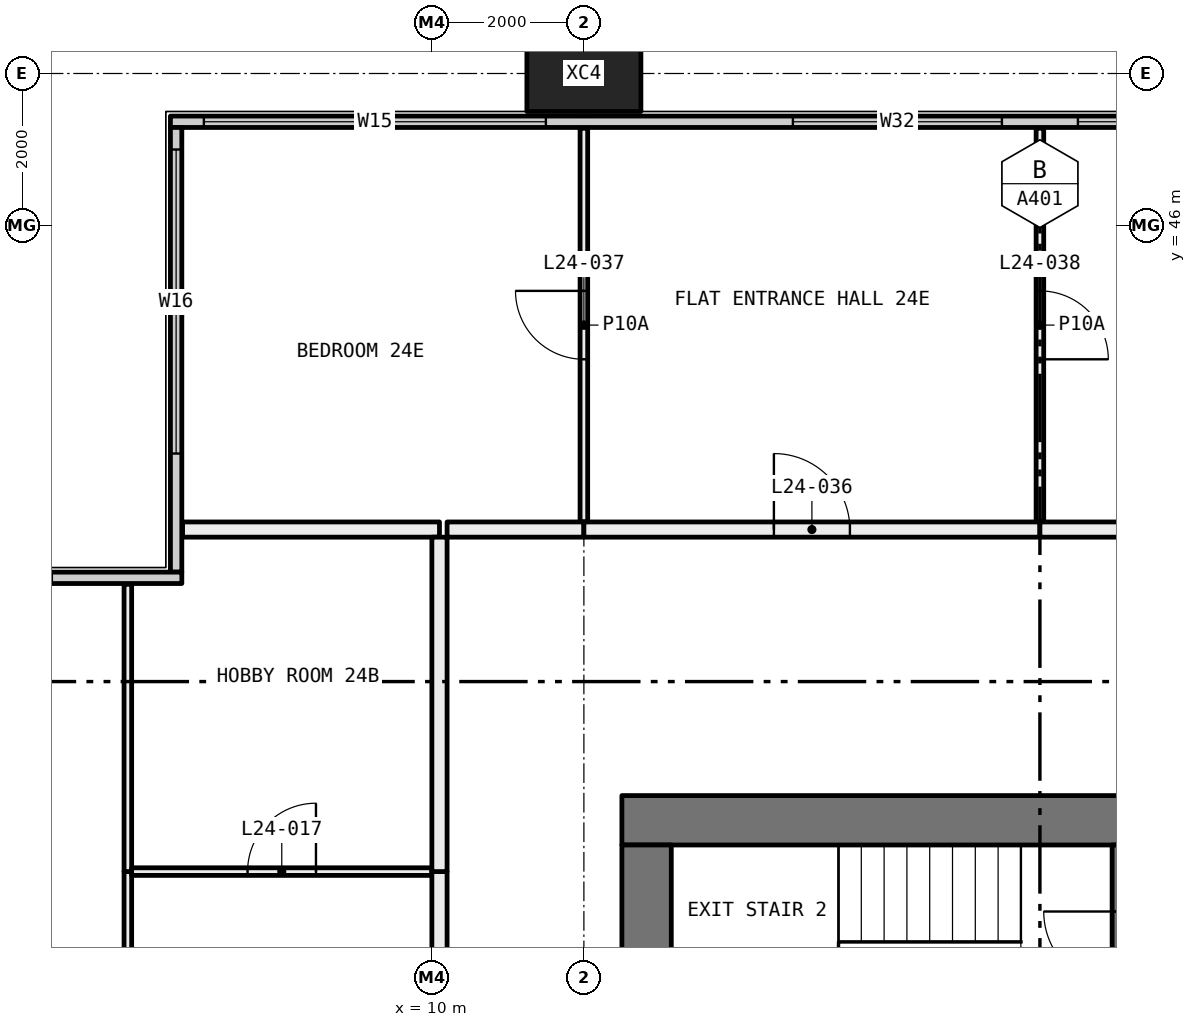
"""IFC4 building model, lengths in metres.
Left out: names, types, materials, properties, quantities, classifications, styles, units other than length and angle.
Written with IfcOpenShell. Run it as: python <this file> out.ifc"""

import sys

from ifc_helpers import new_model, si_unit, direction, frame, frame_2d, origin, origin_2d, place, context, subcontext, project, spatial, rectangle, hollow_rectangle, extrude, element, fill, save


model = new_model("IFC4")
c1 = context("Model", 3, precision=1e-05, world=origin(), true_north=direction((0.0, 1.0)))
c2 = subcontext(c1, "Body", "Model", "MODEL_VIEW")
j1 = project(units=[si_unit("LENGTHUNIT", "METRE"), si_unit("PLANEANGLEUNIT", "RADIAN")], contexts=[c1])
p1 = place(None, origin())
s1 = spatial("IfcSite", under=j1, at=p1, CompositionType="ELEMENT")
p2 = place(p1, origin())
s2 = spatial("IfcBuilding", under=s1, at=p2, CompositionType="ELEMENT")
p3 = place(p2, frame((0.0, 0.0, 96.6)))
s3 = spatial("IfcBuildingStorey", under=s2, at=p3, CompositionType="ELEMENT", Elevation=96.6)
p4 = place(p3, frame((12.0, 48.0, -0.4), z_axis=(0.0, 0.0, 1.0), x_axis=(1.0, 0.0, 0.0)))
e1 = element("IfcColumn", 1, at=p4, inside=s3, PredefinedType="COLUMN", context=c2, shape_type="SweptSolid", body=[
    extrude(hollow_rectangle(XDim=1.5, YDim=1.0, WallThickness=0.06, at=origin_2d()), origin(), (0.0, 0.0, 1.0), 3.45),
])
p5 = place(p3, frame((6.56, 47.365, 0.0), z_axis=(0.0, 0.0, 1.0), x_axis=(1.0, 0.0, 0.0)))
e2 = element("IfcWall", 2, at=p5, inside=s3, PredefinedType="ELEMENTEDWALL", context=c2, shape_type="SweptSolid", body=[
    extrude(rectangle(XDim=58.88, YDim=0.15, at=frame_2d((29.44, 0.0))), origin(), (0.0, 0.0, 1.0), 3.05),
])
p6 = place(p5, frame((0.44, 0.0, 0.45)))
e3 = element("IfcOpeningElement", 3, at=p6, cuts=e2, PredefinedType="OPENING", context=c2, shape_type="SweptSolid", body=[
    extrude(rectangle(XDim=4.5, YDim=2.55, at=frame_2d((2.25, 1.275))), frame((0.0, 0.085, 0.0), z_axis=(0.0, -1.0, 0.0), x_axis=(1.0, 0.0, 0.0)), (0.0, 0.0, 1.0), 0.17),
])
p7 = place(p5, frame((8.19, 0.0, 0.45)))
e4 = element("IfcOpeningElement", 4, at=p7, cuts=e2, PredefinedType="OPENING", context=c2, shape_type="SweptSolid", body=[
    extrude(rectangle(XDim=2.75, YDim=2.55, at=frame_2d((1.375, 1.275))), frame((0.0, 0.085, 0.0), z_axis=(0.0, -1.0, 0.0), x_axis=(1.0, 0.0, 0.0)), (0.0, 0.0, 1.0), 0.17),
])
p8 = place(p5, frame((11.94, 0.0, 0.45)))
e5 = element("IfcOpeningElement", 5, at=p8, cuts=e2, PredefinedType="OPENING", context=c2, shape_type="SweptSolid", body=[
    extrude(rectangle(XDim=2.75, YDim=2.55, at=frame_2d((1.375, 1.275))), frame((0.0, 0.085, 0.0), z_axis=(0.0, -1.0, 0.0), x_axis=(1.0, 0.0, 0.0)), (0.0, 0.0, 1.0), 0.17),
])
p9 = place(p5, frame((20.19, 0.0, 0.45)))
e6 = element("IfcOpeningElement", 6, at=p9, cuts=e2, PredefinedType="OPENING", context=c2, shape_type="SweptSolid", body=[
    extrude(rectangle(XDim=2.75, YDim=2.55, at=frame_2d((1.375, 1.275))), frame((0.0, 0.085, 0.0), z_axis=(0.0, -1.0, 0.0), x_axis=(1.0, 0.0, 0.0)), (0.0, 0.0, 1.0), 0.17),
])
p10 = place(p5, frame((23.94, 0.0, 0.45)))
e7 = element("IfcOpeningElement", 7, at=p10, cuts=e2, PredefinedType="OPENING", context=c2, shape_type="SweptSolid", body=[
    extrude(rectangle(XDim=2.0, YDim=2.55, at=frame_2d((1.0, 1.275))), frame((0.0, 0.085, 0.0), z_axis=(0.0, -1.0, 0.0), x_axis=(1.0, 0.0, 0.0)), (0.0, 0.0, 1.0), 0.17),
])
p11 = place(p5, frame((32.19, 0.0, 0.45)))
e8 = element("IfcOpeningElement", 8, at=p11, cuts=e2, PredefinedType="OPENING", context=c2, shape_type="SweptSolid", body=[
    extrude(rectangle(XDim=2.75, YDim=2.55, at=frame_2d((1.375, 1.275))), frame((0.0, 0.085, 0.0), z_axis=(0.0, -1.0, 0.0), x_axis=(1.0, 0.0, 0.0)), (0.0, 0.0, 1.0), 0.17),
])
p12 = place(p5, frame((35.94, 0.0, 0.45)))
e9 = element("IfcOpeningElement", 9, at=p12, cuts=e2, PredefinedType="OPENING", context=c2, shape_type="SweptSolid", body=[
    extrude(rectangle(XDim=2.75, YDim=2.55, at=frame_2d((1.375, 1.275))), frame((0.0, 0.085, 0.0), z_axis=(0.0, -1.0, 0.0), x_axis=(1.0, 0.0, 0.0)), (0.0, 0.0, 1.0), 0.17),
])
p13 = place(p5, frame((44.19, 0.0, 0.45)))
e10 = element("IfcOpeningElement", 10, at=p13, cuts=e2, PredefinedType="OPENING", context=c2, shape_type="SweptSolid", body=[
    extrude(rectangle(XDim=2.75, YDim=2.55, at=frame_2d((1.375, 1.275))), frame((0.0, 0.085, 0.0), z_axis=(0.0, -1.0, 0.0), x_axis=(1.0, 0.0, 0.0)), (0.0, 0.0, 1.0), 0.17),
])
p14 = place(p5, frame((47.94, 0.0, 0.45)))
e11 = element("IfcOpeningElement", 11, at=p14, cuts=e2, PredefinedType="OPENING", context=c2, shape_type="SweptSolid", body=[
    extrude(rectangle(XDim=2.0, YDim=2.55, at=frame_2d((1.0, 1.275))), frame((0.0, 0.085, 0.0), z_axis=(0.0, -1.0, 0.0), x_axis=(1.0, 0.0, 0.0)), (0.0, 0.0, 1.0), 0.17),
])
p15 = place(p5, frame((53.94, 0.0, 0.45)))
e12 = element("IfcOpeningElement", 12, at=p15, cuts=e2, PredefinedType="OPENING", context=c2, shape_type="SweptSolid", body=[
    extrude(rectangle(XDim=4.5, YDim=2.55, at=frame_2d((2.25, 1.275))), frame((0.0, 0.085, 0.0), z_axis=(0.0, -1.0, 0.0), x_axis=(1.0, 0.0, 0.0)), (0.0, 0.0, 1.0), 0.17),
])
p16 = place(p3, frame((6.635, 41.44, 0.0), z_axis=(0.0, 0.0, 1.0), x_axis=(0.0, 1.0, 0.0)))
e13 = element("IfcWall", 13, at=p16, inside=s3, PredefinedType="ELEMENTEDWALL", context=c2, shape_type="SweptSolid", body=[
    extrude(rectangle(XDim=5.85, YDim=0.15, at=frame_2d((2.925, 0.0))), origin(), (0.0, 0.0, 1.0), 3.05),
])
p17 = place(p16, frame((1.56, 0.0, 0.45)))
e14 = element("IfcOpeningElement", 14, at=p17, cuts=e13, PredefinedType="OPENING", context=c2, shape_type="SweptSolid", body=[
    extrude(rectangle(XDim=4.0, YDim=2.55, at=frame_2d((2.0, 1.275))), frame((0.0, 0.085, 0.0), z_axis=(0.0, -1.0, 0.0), x_axis=(1.0, 0.0, 0.0)), (0.0, 0.0, 1.0), 0.17),
])
p18 = place(p3, frame((0.56, 41.365, 0.0), z_axis=(0.0, 0.0, 1.0), x_axis=(1.0, 0.0, 0.0)))
e15 = element("IfcWall", 15, at=p18, inside=s3, PredefinedType="ELEMENTEDWALL", context=c2, shape_type="SweptSolid", body=[
    extrude(rectangle(XDim=6.15, YDim=0.15, at=frame_2d((3.075, 0.0))), origin(), (0.0, 0.0, 1.0), 3.05),
])
p19 = place(p18, frame((0.44, 0.0, 0.45)))
e16 = element("IfcOpeningElement", 16, at=p19, cuts=e15, PredefinedType="OPENING", context=c2, shape_type="SweptSolid", body=[
    extrude(rectangle(XDim=4.0, YDim=2.55, at=frame_2d((2.0, 1.275))), frame((0.0, 0.085, 0.0), z_axis=(0.0, -1.0, 0.0), x_axis=(1.0, 0.0, 0.0)), (0.0, 0.0, 1.0), 0.17),
])
p20 = place(p3, frame((6.0, 36.1, 0.0), z_axis=(0.0, 0.0, 1.0), x_axis=(0.0, 1.0, 0.0)))
e17 = element("IfcWall", 17, at=p20, inside=s3, PredefinedType="PARTITIONING", context=c2, shape_type="SweptSolid", body=[
    extrude(rectangle(XDim=1.4, YDim=0.1, at=frame_2d((0.7, 0.0))), origin(), (0.0, 0.0, 1.0), 3.05),
])
p21 = place(p3, frame((6.0, 37.5, 0.0), z_axis=(0.0, 0.0, 1.0), x_axis=(0.0, 1.0, 0.0)))
e18 = element("IfcWall", 18, at=p21, inside=s3, PredefinedType="PARTITIONING", context=c2, shape_type="SweptSolid", body=[
    extrude(rectangle(XDim=3.78, YDim=0.1, at=frame_2d((1.89, 0.0))), origin(), (0.0, 0.0, 1.0), 3.05),
])
p22 = place(p3, frame((10.0, 37.5, 0.0), z_axis=(0.0, 0.0, 1.0), x_axis=(-1.0, 0.0, 0.0)))
e19 = element("IfcWall", 19, at=p22, inside=s3, PredefinedType="PARTITIONING", context=c2, shape_type="SweptSolid", body=[
    extrude(rectangle(XDim=3.95, YDim=0.1, at=frame_2d((1.975, 0.0))), origin(), (0.0, 0.0, 1.0), 3.05),
])
p23 = place(p22, frame((1.525, 0.0, 0.0)))
e20 = element("IfcOpeningElement", 20, at=p23, cuts=e19, PredefinedType="OPENING", context=c2, shape_type="SweptSolid", body=[
    extrude(rectangle(XDim=0.9, YDim=2.1, at=frame_2d((0.45, 1.05))), frame((0.0, 0.06, 0.0), z_axis=(0.0, -1.0, 0.0), x_axis=(1.0, 0.0, 0.0)), (0.0, 0.0, 1.0), 0.12),
])
p24 = place(p3, frame((10.1, 36.1, 0.0), z_axis=(0.0, 0.0, 1.0), x_axis=(0.0, 1.0, 0.0)))
e21 = element("IfcWall", 21, at=p24, inside=s3, PredefinedType="PARTITIONING", context=c2, shape_type="SweptSolid", body=[
    extrude(rectangle(XDim=1.4, YDim=0.2, at=frame_2d((0.7, 0.0))), origin(), (0.0, 0.0, 1.0), 3.05),
])
p25 = place(p3, frame((10.1, 42.0, 0.0), z_axis=(0.0, 0.0, 1.0), x_axis=(-1.0, 0.0, 0.0)))
e22 = element("IfcWall", 22, at=p25, inside=s3, PredefinedType="PARTITIONING", context=c2, shape_type="SweptSolid", body=[
    extrude(rectangle(XDim=3.38, YDim=0.2, at=frame_2d((1.69, 0.0))), origin(), (0.0, 0.0, 1.0), 3.05),
])
p26 = place(p3, frame((10.1, 37.5, 0.0), z_axis=(0.0, 0.0, 1.0), x_axis=(0.0, 1.0, 0.0)))
e23 = element("IfcWall", 23, at=p26, inside=s3, PredefinedType="PARTITIONING", context=c2, shape_type="SweptSolid", body=[
    extrude(rectangle(XDim=4.4, YDim=0.2, at=frame_2d((2.2, 0.0))), origin(), (0.0, 0.0, 1.0), 3.05),
])
p27 = place(p3, frame((12.0, 42.1, 0.0), z_axis=(0.0, 0.0, 1.0), x_axis=(0.0, 1.0, 0.0)))
e24 = element("IfcWall", 24, at=p27, inside=s3, PredefinedType="PARTITIONING", context=c2, shape_type="SweptSolid", body=[
    extrude(rectangle(XDim=5.18, YDim=0.1, at=frame_2d((2.59, 0.0))), origin(), (0.0, 0.0, 1.0), 3.05),
])
p28 = place(p27, frame((2.14, 0.0, 0.0)))
e25 = element("IfcOpeningElement", 25, at=p28, cuts=e24, PredefinedType="OPENING", context=c2, shape_type="SweptSolid", body=[
    extrude(rectangle(XDim=0.9, YDim=2.1, at=frame_2d((0.45, 1.05))), frame((0.0, 0.06, 0.0), z_axis=(0.0, -1.0, 0.0), x_axis=(1.0, 0.0, 0.0)), (0.0, 0.0, 1.0), 0.12),
])
p29 = place(p3, frame((10.2, 42.0, 0.0), z_axis=(0.0, 0.0, 1.0), x_axis=(1.0, 0.0, 0.0)))
e26 = element("IfcWall", 26, at=p29, inside=s3, PredefinedType="PARTITIONING", context=c2, shape_type="SweptSolid", body=[
    extrude(rectangle(XDim=1.8, YDim=0.2, at=frame_2d((0.9, 0.0))), origin(), (0.0, 0.0, 1.0), 3.05),
])
p30 = place(p3, frame((18.0, 42.1, 0.0), z_axis=(0.0, 0.0, 1.0), x_axis=(0.0, 1.0, 0.0)))
e27 = element("IfcWall", 27, at=p30, inside=s3, PredefinedType="PARTITIONING", context=c2, shape_type="SweptSolid", body=[
    extrude(rectangle(XDim=5.18, YDim=0.1, at=frame_2d((2.59, 0.0))), origin(), (0.0, 0.0, 1.0), 3.05),
])
p31 = place(p30, frame((2.14, 0.0, 0.0)))
e28 = element("IfcOpeningElement", 28, at=p31, cuts=e27, PredefinedType="OPENING", context=c2, shape_type="SweptSolid", body=[
    extrude(rectangle(XDim=0.9, YDim=2.1, at=frame_2d((0.45, 1.05))), frame((0.0, 0.06, 0.0), z_axis=(0.0, -1.0, 0.0), x_axis=(1.0, 0.0, 0.0)), (0.0, 0.0, 1.0), 0.12),
])
p32 = place(p3, frame((12.0, 42.0, 0.0), z_axis=(0.0, 0.0, 1.0), x_axis=(1.0, 0.0, 0.0)))
e29 = element("IfcWall", 29, at=p32, inside=s3, PredefinedType="PARTITIONING", context=c2, shape_type="SweptSolid", body=[
    extrude(rectangle(XDim=6.0, YDim=0.2, at=frame_2d((3.0, 0.0))), origin(), (0.0, 0.0, 1.0), 3.05),
])
p33 = place(p32, frame((2.5, 0.0, 0.0)))
e30 = element("IfcOpeningElement", 30, at=p33, cuts=e29, PredefinedType="OPENING", context=c2, shape_type="SweptSolid", body=[
    extrude(rectangle(XDim=1.0, YDim=2.1, at=frame_2d((0.5, 1.05))), frame((0.0, 0.11, 0.0), z_axis=(0.0, -1.0, 0.0), x_axis=(1.0, 0.0, 0.0)), (0.0, 0.0, 1.0), 0.22),
])
p34 = place(p3, frame((18.0, 42.0, 0.0), z_axis=(0.0, 0.0, 1.0), x_axis=(1.0, 0.0, 0.0)))
e31 = element("IfcWall", 31, at=p34, inside=s3, PredefinedType="PARTITIONING", context=c2, shape_type="SweptSolid", body=[
    extrude(rectangle(XDim=6.0, YDim=0.2, at=frame_2d((3.0, 0.0))), origin(), (0.0, 0.0, 1.0), 3.05),
])
p35 = place(p3, frame((12.5, 38.175, 0.0), z_axis=(0.0, 0.0, 1.0), x_axis=(1.0, 0.0, 0.0)))
e32 = element("IfcWall", 32, at=p35, inside=s3, PredefinedType="SHEAR", context=c2, shape_type="SweptSolid", body=[
    extrude(rectangle(XDim=11.0, YDim=0.65, at=frame_2d((5.5, 0.0))), origin(), (0.0, 0.0, 1.0), 3.05),
])
p36 = place(p35, frame((8.475, 0.0, 0.0)))
e33 = element("IfcOpeningElement", 33, at=p36, cuts=e32, PredefinedType="OPENING", context=c2, shape_type="SweptSolid", body=[
    extrude(rectangle(XDim=1.6, YDim=2.1, at=frame_2d((0.8, 1.05))), frame((0.0, 0.335, 0.0), z_axis=(0.0, -1.0, 0.0), x_axis=(1.0, 0.0, 0.0)), (0.0, 0.0, 1.0), 0.67),
])
p37 = place(p3, frame((12.825, 22.15, 0.0), z_axis=(0.0, 0.0, 1.0), x_axis=(0.0, 1.0, 0.0)))
e34 = element("IfcWall", 34, at=p37, inside=s3, PredefinedType="SHEAR", context=c2, shape_type="SweptSolid", body=[
    extrude(rectangle(XDim=15.7, YDim=0.65, at=frame_2d((7.85, 0.0))), origin(), (0.0, 0.0, 1.0), 3.05),
])
p38 = place(p37, frame((8.3, 0.0, 0.0)))
e35 = element("IfcOpeningElement", 35, at=p38, cuts=e34, PredefinedType="OPENING", context=c2, shape_type="SweptSolid", body=[
    extrude(rectangle(XDim=1.6, YDim=2.1, at=frame_2d((0.8, 1.05))), frame((0.0, 0.335, 0.0), z_axis=(0.0, -1.0, 0.0), x_axis=(1.0, 0.0, 0.0)), (0.0, 0.0, 1.0), 0.67),
])
p39 = place(p37, frame((2.125, 0.0, 0.0)))
e36 = element("IfcOpeningElement", 36, at=p39, cuts=e34, PredefinedType="OPENING", context=c2, shape_type="SweptSolid", body=[
    extrude(rectangle(XDim=1.0, YDim=2.1, at=frame_2d((0.5, 1.05))), frame((0.0, 0.335, 0.0), z_axis=(0.0, -1.0, 0.0), x_axis=(1.0, 0.0, 0.0)), (0.0, 0.0, 1.0), 0.67),
])
p40 = place(p3, frame((19.05, 35.1, 0.0), z_axis=(0.0, 0.0, 1.0), x_axis=(0.0, 1.0, 0.0)))
e37 = element("IfcWall", 37, at=p40, inside=s3, PredefinedType="SOLIDWALL", context=c2, shape_type="SweptSolid", body=[
    extrude(rectangle(XDim=2.75, YDim=0.2, at=frame_2d((1.375, 0.0))), origin(), (0.0, 0.0, 1.0), 3.05),
])
p41 = place(p40, frame((0.875, 0.0, 0.0)))
e38 = element("IfcOpeningElement", 38, at=p41, cuts=e37, PredefinedType="OPENING", context=c2, shape_type="SweptSolid", body=[
    extrude(rectangle(XDim=1.0, YDim=2.1, at=frame_2d((0.5, 1.05))), frame((0.0, 0.11, 0.0), z_axis=(0.0, -1.0, 0.0), x_axis=(1.0, 0.0, 0.0)), (0.0, 0.0, 1.0), 0.22),
])
p42 = place(p6, origin())
e39 = element("IfcWindow", 39, at=p42, inside=s3, PartitioningType="SINGLE_PANEL", PredefinedType="WINDOW", context=c2, shape_type="SweptSolid", body=[
    extrude(rectangle(XDim=4.5, YDim=2.55, at=frame_2d((2.25, 1.275))), frame((0.0, 0.03, 0.0), z_axis=(0.0, -1.0, 0.0), x_axis=(1.0, 0.0, 0.0)), (0.0, 0.0, 1.0), 0.06),
])
fill(e3, e39)
p43 = place(p7, origin())
e40 = element("IfcWindow", 40, at=p43, inside=s3, PartitioningType="SINGLE_PANEL", PredefinedType="WINDOW", context=c2, shape_type="SweptSolid", body=[
    extrude(rectangle(XDim=2.75, YDim=2.55, at=frame_2d((1.375, 1.275))), frame((0.0, 0.03, 0.0), z_axis=(0.0, -1.0, 0.0), x_axis=(1.0, 0.0, 0.0)), (0.0, 0.0, 1.0), 0.06),
])
fill(e4, e40)
p44 = place(p8, origin())
e41 = element("IfcWindow", 41, at=p44, inside=s3, PartitioningType="SINGLE_PANEL", PredefinedType="WINDOW", context=c2, shape_type="SweptSolid", body=[
    extrude(rectangle(XDim=2.75, YDim=2.55, at=frame_2d((1.375, 1.275))), frame((0.0, 0.03, 0.0), z_axis=(0.0, -1.0, 0.0), x_axis=(1.0, 0.0, 0.0)), (0.0, 0.0, 1.0), 0.06),
])
fill(e5, e41)
p45 = place(p17, origin())
e42 = element("IfcWindow", 42, at=p45, inside=s3, PartitioningType="SINGLE_PANEL", PredefinedType="WINDOW", context=c2, shape_type="SweptSolid", body=[
    extrude(rectangle(XDim=4.0, YDim=2.55, at=frame_2d((2.0, 1.275))), frame((0.0, 0.03, 0.0), z_axis=(0.0, -1.0, 0.0), x_axis=(1.0, 0.0, 0.0)), (0.0, 0.0, 1.0), 0.06),
])
fill(e14, e42)
p46 = place(p23, frame((0.9, 0.0, 0.0), x_axis=(-1.0, 0.0, 0.0)))
e43 = element("IfcDoor", 43, at=p46, inside=s3, OperationType="SINGLE_SWING_LEFT", PredefinedType="DOOR", context=c2, shape_type="SweptSolid", body=[
    extrude(rectangle(XDim=0.9, YDim=2.1, at=frame_2d((0.45, 1.05))), frame((0.0, 0.025, 0.0), z_axis=(0.0, -1.0, 0.0), x_axis=(1.0, 0.0, 0.0)), (0.0, 0.0, 1.0), 0.05),
])
fill(e20, e43)
p47 = place(p33, origin())
e44 = element("IfcDoor", 44, at=p47, inside=s3, OperationType="SINGLE_SWING_RIGHT", PredefinedType="DOOR", context=c2, shape_type="SweptSolid", body=[
    extrude(rectangle(XDim=1.0, YDim=2.1, at=frame_2d((0.5, 1.05))), frame((0.0, 0.025, 0.0), z_axis=(0.0, -1.0, 0.0), x_axis=(1.0, 0.0, 0.0)), (0.0, 0.0, 1.0), 0.05),
])
fill(e30, e44)
p48 = place(p28, origin())
e45 = element("IfcDoor", 45, at=p48, inside=s3, OperationType="SINGLE_SWING_LEFT", PredefinedType="DOOR", context=c2, shape_type="SweptSolid", body=[
    extrude(rectangle(XDim=0.9, YDim=2.1, at=frame_2d((0.45, 1.05))), frame((0.0, 0.025, 0.0), z_axis=(0.0, -1.0, 0.0), x_axis=(1.0, 0.0, 0.0)), (0.0, 0.0, 1.0), 0.05),
])
fill(e25, e45)
p49 = place(p31, frame((0.9, 0.0, 0.0), x_axis=(-1.0, 0.0, 0.0)))
e46 = element("IfcDoor", 46, at=p49, inside=s3, OperationType="SINGLE_SWING_LEFT", PredefinedType="DOOR", context=c2, shape_type="SweptSolid", body=[
    extrude(rectangle(XDim=0.9, YDim=2.1, at=frame_2d((0.45, 1.05))), frame((0.0, 0.025, 0.0), z_axis=(0.0, -1.0, 0.0), x_axis=(1.0, 0.0, 0.0)), (0.0, 0.0, 1.0), 0.05),
])
fill(e28, e46)
save(model, sys.argv[1])
